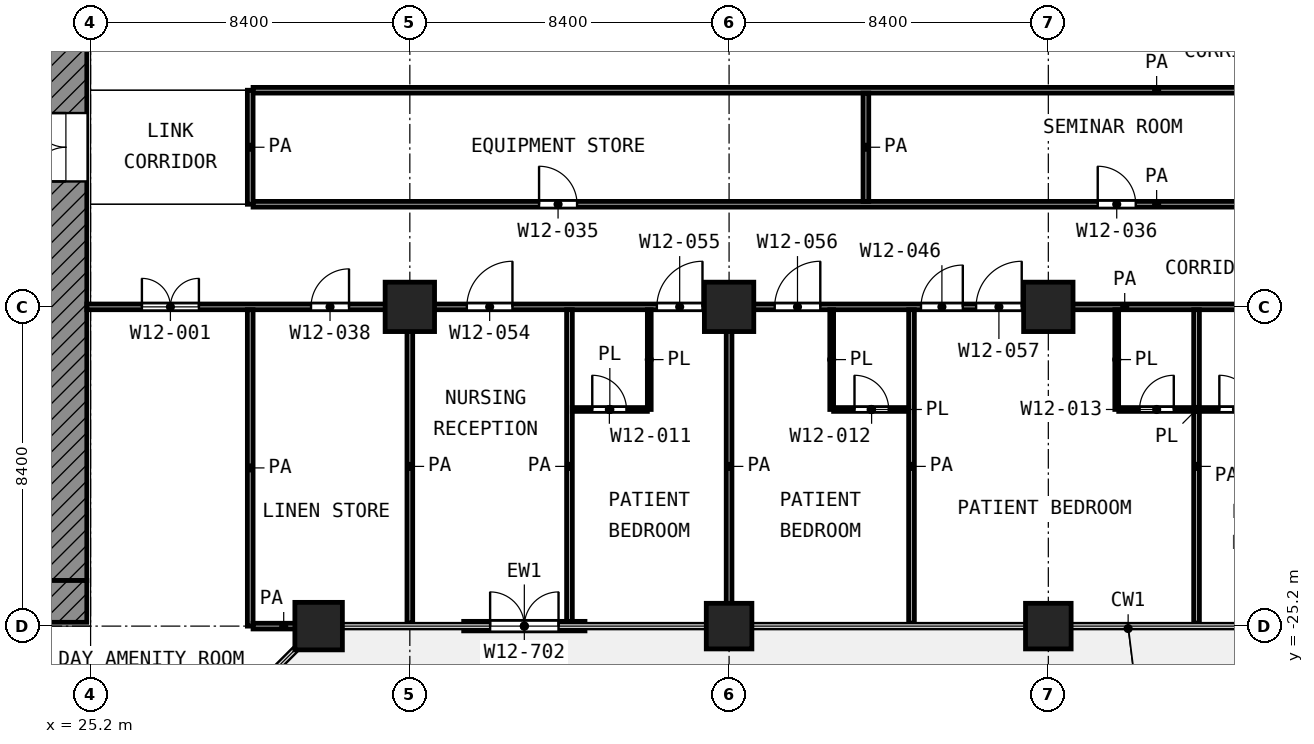
"""IFC4 building model, lengths in metres.
Left out: names, types, materials, properties, quantities, classifications, styles, units other than length and angle.
Written with IfcOpenShell. Run it as: python <this file> out.ifc"""

import sys

from ifc_helpers import new_model, si_unit, direction, frame, frame_2d, origin, origin_2d, place, context, subcontext, project, spatial, rectangle, extrude, element, fill, save


model = new_model("IFC4")
c1 = context("Model", 3, precision=1e-05, world=origin(), true_north=direction((0.0, 1.0)))
c2 = subcontext(c1, "Body", "Model", "MODEL_VIEW")
j1 = project(units=[si_unit("LENGTHUNIT", "METRE"), si_unit("PLANEANGLEUNIT", "RADIAN")], contexts=[c1])
p1 = place(None, origin())
s1 = spatial("IfcSite", under=j1, at=p1, CompositionType="ELEMENT")
p2 = place(p1, origin())
s2 = spatial("IfcBuilding", under=s1, at=p2, CompositionType="ELEMENT")
p3 = place(p2, frame((0.0, 0.0, 56.0)))
s3 = spatial("IfcBuildingStorey", under=s2, at=p3, CompositionType="ELEMENT", Elevation=56.0)
for number, where, z_axis, x_axis in (
    (1, (33.6, -16.8, 0.0), (0.0, 0.0, 1.0), (1.0, 0.0, 0.0)),
    (2, (42.0, -16.8, 0.0), (0.0, 0.0, 1.0), (1.0, 0.0, 0.0)),
    (3, (50.4, -16.8, 0.0), (0.0, 0.0, 1.0), (1.0, 0.0, 0.0)),
):
    element("IfcColumn", number, at=place(p3, frame(where, z_axis=z_axis, x_axis=x_axis)), inside=s3, PredefinedType="COLUMN", context=c2, shape_type="SweptSolid", body=[
        extrude(rectangle(XDim=1.3, YDim=1.3, at=origin_2d()), origin(), (0.0, 0.0, 1.0), 4.2),
    ])
p4 = place(p3, frame((31.2, -25.2, 0.0), z_axis=(0.0, 0.0, 1.0), x_axis=(1.0, 0.0, 0.0)))
e4 = element("IfcColumn", 4, at=p4, inside=s3, PredefinedType="COLUMN", context=c2, shape_type="SweptSolid", body=[
    extrude(rectangle(XDim=1.25, YDim=1.25, at=origin_2d()), origin(), (0.0, 0.0, 1.0), 4.2),
])
for number, where, z_axis, x_axis in (
    (5, (42.0, -25.2, 0.0), (0.0, 0.0, 1.0), (1.0, 0.0, 0.0)),
    (6, (50.4, -25.2, 0.0), (0.0, 0.0, 1.0), (1.0, 0.0, 0.0)),
):
    element("IfcColumn", number, at=place(p3, frame(where, z_axis=z_axis, x_axis=x_axis)), inside=s3, PredefinedType="COLUMN", context=c2, shape_type="SweptSolid", body=[
        extrude(rectangle(XDim=1.2, YDim=1.2, at=origin_2d()), origin(), (0.0, 0.0, 1.0), 4.2),
    ])
p5 = place(p3, frame((35.017, -25.2, 0.0), z_axis=(0.0, 0.0, 1.0), x_axis=(1.0, 0.0, 0.0)))
e7 = element("IfcWall", 7, at=p5, inside=s3, PredefinedType="SOLIDWALL", context=c2, shape_type="SweptSolid", body=[
    extrude(rectangle(XDim=3.192, YDim=0.25, at=frame_2d((1.596, 0.0))), origin(), (0.0, 0.0, 1.0), 3.78),
])
p6 = place(p5, frame((0.696, 0.0, 0.0)))
e8 = element("IfcOpeningElement", 8, at=p6, cuts=e7, PredefinedType="OPENING", context=c2, shape_type="SweptSolid", body=[
    extrude(rectangle(XDim=1.8, YDim=2.1, at=frame_2d((0.9, 1.05))), frame((0.0, 0.135, 0.0), z_axis=(0.0, -1.0, 0.0), x_axis=(1.0, 0.0, 0.0)), (0.0, 0.0, 1.0), 0.27),
])
p7 = place(p3, frame((24.55, -24.0, 0.0), z_axis=(0.0, 0.0, 1.0), x_axis=(0.0, 1.0, 0.0)))
e9 = element("IfcWall", 9, at=p7, inside=s3, PredefinedType="SHEAR", context=c2, shape_type="SweptSolid", body=[
    extrude(rectangle(XDim=18.6, YDim=1.1, at=frame_2d((9.3, 0.0))), origin(), (0.0, 0.0, 1.0), 3.9),
])
p8 = place(p7, frame((10.5, 0.0, 0.0)))
e10 = element("IfcOpeningElement", 10, at=p8, cuts=e9, PredefinedType="OPENING", context=c2, shape_type="SweptSolid", body=[
    extrude(rectangle(XDim=1.8, YDim=2.1, at=frame_2d((0.9, 1.05))), frame((0.0, 0.56, 0.0), z_axis=(0.0, -1.0, 0.0), x_axis=(1.0, 0.0, 0.0)), (0.0, 0.0, 1.0), 1.12),
])
p9 = place(p3, frame((24.55, -25.1, 0.0), z_axis=(0.0, 0.0, 1.0), x_axis=(0.0, 1.0, 0.0)))
e11 = element("IfcWall", 11, at=p9, inside=s3, PredefinedType="SHEAR", context=c2, shape_type="SweptSolid", body=[
    extrude(rectangle(XDim=1.1, YDim=1.1, at=frame_2d((0.55, 0.0))), origin(), (0.0, 0.0, 1.0), 3.9),
])
p10 = place(p3, frame((37.875, -19.5, 0.0), z_axis=(0.0, 0.0, 1.0), x_axis=(1.0, 0.0, 0.0)))
e12 = element("IfcWall", 12, at=p10, inside=s3, PredefinedType="PARTITIONING", context=c2, shape_type="SweptSolid", body=[
    extrude(rectangle(XDim=1.975, YDim=0.1, at=frame_2d((0.988, 0.0))), origin(), (0.0, 0.0, 1.0), 3.9),
])
p11 = place(p10, frame((0.525, 0.0, 0.0)))
e13 = element("IfcOpeningElement", 13, at=p11, cuts=e12, PredefinedType="OPENING", context=c2, shape_type="SweptSolid", body=[
    extrude(rectangle(XDim=0.9, YDim=2.1, at=frame_2d((0.45, 1.05))), frame((0.0, 0.06, 0.0), z_axis=(0.0, -1.0, 0.0), x_axis=(1.0, 0.0, 0.0)), (0.0, 0.0, 1.0), 0.12),
])
p12 = place(p3, frame((44.75, -19.5, 0.0), z_axis=(0.0, 0.0, 1.0), x_axis=(1.0, 0.0, 0.0)))
e14 = element("IfcWall", 14, at=p12, inside=s3, PredefinedType="PARTITIONING", context=c2, shape_type="SweptSolid", body=[
    extrude(rectangle(XDim=1.975, YDim=0.1, at=frame_2d((0.988, 0.0))), origin(), (0.0, 0.0, 1.0), 3.9),
])
p13 = place(p12, frame((0.55, 0.0, 0.0)))
e15 = element("IfcOpeningElement", 15, at=p13, cuts=e14, PredefinedType="OPENING", context=c2, shape_type="SweptSolid", body=[
    extrude(rectangle(XDim=0.9, YDim=2.1, at=frame_2d((0.45, 1.05))), frame((0.0, 0.06, 0.0), z_axis=(0.0, -1.0, 0.0), x_axis=(1.0, 0.0, 0.0)), (0.0, 0.0, 1.0), 0.12),
])
p14 = place(p3, frame((52.252, -19.5, 0.0), z_axis=(0.0, 0.0, 1.0), x_axis=(1.0, 0.0, 0.0)))
e16 = element("IfcWall", 16, at=p14, inside=s3, PredefinedType="PARTITIONING", context=c2, shape_type="SweptSolid", body=[
    extrude(rectangle(XDim=4.098, YDim=0.1, at=frame_2d((2.049, 0.0))), origin(), (0.0, 0.0, 1.0), 3.9),
])
p15 = place(p14, frame((0.549, 0.0, 0.0)))
e17 = element("IfcOpeningElement", 17, at=p15, cuts=e16, PredefinedType="OPENING", context=c2, shape_type="SweptSolid", body=[
    extrude(rectangle(XDim=0.9, YDim=2.1, at=frame_2d((0.45, 1.05))), frame((0.0, 0.06, 0.0), z_axis=(0.0, -1.0, 0.0), x_axis=(1.0, 0.0, 0.0)), (0.0, 0.0, 1.0), 0.12),
])
p16 = place(p14, frame((2.648, 0.0, 0.0)))
e18 = element("IfcOpeningElement", 18, at=p16, cuts=e16, PredefinedType="OPENING", context=c2, shape_type="SweptSolid", body=[
    extrude(rectangle(XDim=0.9, YDim=2.1, at=frame_2d((0.45, 1.05))), frame((0.0, 0.06, 0.0), z_axis=(0.0, -1.0, 0.0), x_axis=(1.0, 0.0, 0.0)), (0.0, 0.0, 1.0), 0.12),
])
for number, where, z_axis, x_axis in (
    (19, (39.9, -19.5, 0.0), (0.0, 0.0, 1.0), (0.0, 1.0, 0.0)),
    (20, (44.7, -19.5, 0.0), (0.0, 0.0, 1.0), (0.0, 1.0, 0.0)),
):
    element("IfcWall", number, at=place(p3, frame(where, z_axis=z_axis, x_axis=x_axis)), inside=s3, PredefinedType="PARTITIONING", context=c2, shape_type="SweptSolid", body=[
        extrude(rectangle(XDim=2.625, YDim=0.1, at=frame_2d((1.312, 0.0))), origin(), (0.0, 0.0, 1.0), 3.9),
    ])
p17 = place(p3, frame((52.2, -19.499, 0.0), z_axis=(0.0, 0.0, 1.0), x_axis=(0.0, 1.0, 0.0)))
e21 = element("IfcWall", 21, at=p17, inside=s3, PredefinedType="PARTITIONING", context=c2, shape_type="SweptSolid", body=[
    extrude(rectangle(XDim=2.624, YDim=0.1, at=frame_2d((1.312, 0.0))), origin(), (0.0, 0.0, 1.0), 3.9),
])
p18 = place(p3, frame((29.475, -25.2, 0.0), z_axis=(0.0, 0.0, 1.0), x_axis=(1.0, 0.0, 0.0)))
e22 = element("IfcWall", 22, at=p18, inside=s3, PredefinedType="PARTITIONING", context=c2, shape_type="SweptSolid", body=[
    extrude(rectangle(XDim=1.612, YDim=0.15, at=frame_2d((0.806, 0.0))), origin(), (0.0, 0.0, 1.0), 3.9),
])
p19 = place(p3, frame((25.1, -16.8, 0.0), z_axis=(0.0, 0.0, 1.0), x_axis=(1.0, 0.0, 0.0)))
e23 = element("IfcWall", 23, at=p19, inside=s3, PredefinedType="PARTITIONING", context=c2, shape_type="SweptSolid", body=[
    extrude(rectangle(XDim=54.62, YDim=0.15, at=frame_2d((27.31, 0.0))), origin(), (0.0, 0.0, 1.0), 3.9),
])
p20 = place(p19, frame((1.45, 0.0, 0.0)))
e24 = element("IfcOpeningElement", 24, at=p20, cuts=e23, PredefinedType="OPENING", context=c2, shape_type="SweptSolid", body=[
    extrude(rectangle(XDim=1.5, YDim=2.1, at=frame_2d((0.75, 1.05))), frame((0.0, 0.085, 0.0), z_axis=(0.0, -1.0, 0.0), x_axis=(1.0, 0.0, 0.0)), (0.0, 0.0, 1.0), 0.17),
])
p21 = place(p19, frame((5.9, 0.0, 0.0)))
e25 = element("IfcOpeningElement", 25, at=p21, cuts=e23, PredefinedType="OPENING", context=c2, shape_type="SweptSolid", body=[
    extrude(rectangle(XDim=1.0, YDim=2.1, at=frame_2d((0.5, 1.05))), frame((0.0, 0.085, 0.0), z_axis=(0.0, -1.0, 0.0), x_axis=(1.0, 0.0, 0.0)), (0.0, 0.0, 1.0), 0.17),
])
p22 = place(p19, frame((10.0, 0.0, 0.0)))
e26 = element("IfcOpeningElement", 26, at=p22, cuts=e23, PredefinedType="OPENING", context=c2, shape_type="SweptSolid", body=[
    extrude(rectangle(XDim=1.2, YDim=2.1, at=frame_2d((0.6, 1.05))), frame((0.0, 0.085, 0.0), z_axis=(0.0, -1.0, 0.0), x_axis=(1.0, 0.0, 0.0)), (0.0, 0.0, 1.0), 0.17),
])
p23 = place(p19, frame((15.0, 0.0, 0.0)))
e27 = element("IfcOpeningElement", 27, at=p23, cuts=e23, PredefinedType="OPENING", context=c2, shape_type="SweptSolid", body=[
    extrude(rectangle(XDim=1.2, YDim=2.1, at=frame_2d((0.6, 1.05))), frame((0.0, 0.085, 0.0), z_axis=(0.0, -1.0, 0.0), x_axis=(1.0, 0.0, 0.0)), (0.0, 0.0, 1.0), 0.17),
])
p24 = place(p19, frame((18.1, 0.0, 0.0)))
e28 = element("IfcOpeningElement", 28, at=p24, cuts=e23, PredefinedType="OPENING", context=c2, shape_type="SweptSolid", body=[
    extrude(rectangle(XDim=1.2, YDim=2.1, at=frame_2d((0.6, 1.05))), frame((0.0, 0.085, 0.0), z_axis=(0.0, -1.0, 0.0), x_axis=(1.0, 0.0, 0.0)), (0.0, 0.0, 1.0), 0.17),
])
p25 = place(p19, frame((23.4, 0.0, 0.0)))
e29 = element("IfcOpeningElement", 29, at=p25, cuts=e23, PredefinedType="OPENING", context=c2, shape_type="SweptSolid", body=[
    extrude(rectangle(XDim=1.2, YDim=2.1, at=frame_2d((0.6, 1.05))), frame((0.0, 0.085, 0.0), z_axis=(0.0, -1.0, 0.0), x_axis=(1.0, 0.0, 0.0)), (0.0, 0.0, 1.0), 0.17),
])
p26 = place(p19, frame((21.95, 0.0, 0.0)))
e30 = element("IfcOpeningElement", 30, at=p26, cuts=e23, PredefinedType="OPENING", context=c2, shape_type="SweptSolid", body=[
    extrude(rectangle(XDim=1.1, YDim=2.1, at=frame_2d((0.55, 1.05))), frame((0.0, 0.085, 0.0), z_axis=(0.0, -1.0, 0.0), x_axis=(1.0, 0.0, 0.0)), (0.0, 0.0, 1.0), 0.17),
])
p27 = place(p19, frame((31.8, 0.0, 0.0)))
e31 = element("IfcOpeningElement", 31, at=p27, cuts=e23, PredefinedType="OPENING", context=c2, shape_type="SweptSolid", body=[
    extrude(rectangle(XDim=1.2, YDim=2.1, at=frame_2d((0.6, 1.05))), frame((0.0, 0.085, 0.0), z_axis=(0.0, -1.0, 0.0), x_axis=(1.0, 0.0, 0.0)), (0.0, 0.0, 1.0), 0.17),
])
p28 = place(p19, frame((34.7, 0.0, 0.0)))
e32 = element("IfcOpeningElement", 32, at=p28, cuts=e23, PredefinedType="OPENING", context=c2, shape_type="SweptSolid", body=[
    extrude(rectangle(XDim=1.2, YDim=2.1, at=frame_2d((0.6, 1.05))), frame((0.0, 0.085, 0.0), z_axis=(0.0, -1.0, 0.0), x_axis=(1.0, 0.0, 0.0)), (0.0, 0.0, 1.0), 0.17),
])
p29 = place(p19, frame((43.3, 0.0, 0.0)))
e33 = element("IfcOpeningElement", 33, at=p29, cuts=e23, PredefinedType="OPENING", context=c2, shape_type="SweptSolid", body=[
    extrude(rectangle(XDim=1.2, YDim=2.1, at=frame_2d((0.6, 1.05))), frame((0.0, 0.085, 0.0), z_axis=(0.0, -1.0, 0.0), x_axis=(1.0, 0.0, 0.0)), (0.0, 0.0, 1.0), 0.17),
])
p30 = place(p19, frame((40.5, 0.0, 0.0)))
e34 = element("IfcOpeningElement", 34, at=p30, cuts=e23, PredefinedType="OPENING", context=c2, shape_type="SweptSolid", body=[
    extrude(rectangle(XDim=0.9, YDim=2.1, at=frame_2d((0.45, 1.05))), frame((0.0, 0.085, 0.0), z_axis=(0.0, -1.0, 0.0), x_axis=(1.0, 0.0, 0.0)), (0.0, 0.0, 1.0), 0.17),
])
p31 = place(p19, frame((48.25, 0.0, 0.0)))
e35 = element("IfcOpeningElement", 35, at=p31, cuts=e23, PredefinedType="OPENING", context=c2, shape_type="SweptSolid", body=[
    extrude(rectangle(XDim=1.5, YDim=2.1, at=frame_2d((0.75, 1.05))), frame((0.0, 0.085, 0.0), z_axis=(0.0, -1.0, 0.0), x_axis=(1.0, 0.0, 0.0)), (0.0, 0.0, 1.0), 0.17),
])
p32 = place(p3, frame((29.475, -14.1, 0.0), z_axis=(0.0, 0.0, 1.0), x_axis=(1.0, 0.0, 0.0)))
e36 = element("IfcWall", 36, at=p32, inside=s3, PredefinedType="PARTITIONING", context=c2, shape_type="SweptSolid", body=[
    extrude(rectangle(XDim=47.55, YDim=0.15, at=frame_2d((23.775, 0.0))), origin(), (0.0, 0.0, 1.0), 3.9),
])
p33 = place(p32, frame((7.525, 0.0, 0.0)))
e37 = element("IfcOpeningElement", 37, at=p33, cuts=e36, PredefinedType="OPENING", context=c2, shape_type="SweptSolid", body=[
    extrude(rectangle(XDim=1.0, YDim=2.1, at=frame_2d((0.5, 1.05))), frame((0.0, 0.085, 0.0), z_axis=(0.0, -1.0, 0.0), x_axis=(1.0, 0.0, 0.0)), (0.0, 0.0, 1.0), 0.17),
])
p34 = place(p32, frame((22.225, 0.0, 0.0)))
e38 = element("IfcOpeningElement", 38, at=p34, cuts=e36, PredefinedType="OPENING", context=c2, shape_type="SweptSolid", body=[
    extrude(rectangle(XDim=1.0, YDim=2.1, at=frame_2d((0.5, 1.05))), frame((0.0, 0.085, 0.0), z_axis=(0.0, -1.0, 0.0), x_axis=(1.0, 0.0, 0.0)), (0.0, 0.0, 1.0), 0.17),
])
p35 = place(p32, frame((31.275, 0.0, 0.0)))
e39 = element("IfcOpeningElement", 39, at=p35, cuts=e36, PredefinedType="OPENING", context=c2, shape_type="SweptSolid", body=[
    extrude(rectangle(XDim=0.9, YDim=2.1, at=frame_2d((0.45, 1.05))), frame((0.0, 0.085, 0.0), z_axis=(0.0, -1.0, 0.0), x_axis=(1.0, 0.0, 0.0)), (0.0, 0.0, 1.0), 0.17),
])
p36 = place(p3, frame((29.475, -11.1, 0.0), z_axis=(0.0, 0.0, 1.0), x_axis=(1.0, 0.0, 0.0)))
e40 = element("IfcWall", 40, at=p36, inside=s3, PredefinedType="PARTITIONING", context=c2, shape_type="SweptSolid", body=[
    extrude(rectangle(XDim=47.55, YDim=0.15, at=frame_2d((23.775, 0.0))), origin(), (0.0, 0.0, 1.0), 3.9),
])
p37 = place(p36, frame((35.425, 0.0, 0.0)))
e41 = element("IfcOpeningElement", 41, at=p37, cuts=e40, PredefinedType="OPENING", context=c2, shape_type="SweptSolid", body=[
    extrude(rectangle(XDim=1.0, YDim=2.1, at=frame_2d((0.5, 1.05))), frame((0.0, 0.085, 0.0), z_axis=(0.0, -1.0, 0.0), x_axis=(1.0, 0.0, 0.0)), (0.0, 0.0, 1.0), 0.17),
])
p38 = place(p36, frame((42.075, 0.0, 0.0)))
e42 = element("IfcOpeningElement", 42, at=p38, cuts=e40, PredefinedType="OPENING", context=c2, shape_type="SweptSolid", body=[
    extrude(rectangle(XDim=1.2, YDim=2.1, at=frame_2d((0.6, 1.05))), frame((0.0, 0.085, 0.0), z_axis=(0.0, -1.0, 0.0), x_axis=(1.0, 0.0, 0.0)), (0.0, 0.0, 1.0), 0.17),
])
p39 = place(p3, frame((29.4, -25.2, 0.0), z_axis=(0.0, 0.0, 1.0), x_axis=(0.0, 1.0, 0.0)))
e43 = element("IfcWall", 43, at=p39, inside=s3, PredefinedType="PARTITIONING", context=c2, shape_type="SweptSolid", body=[
    extrude(rectangle(XDim=8.325, YDim=0.15, at=frame_2d((4.163, 0.0))), origin(), (0.0, 0.0, 1.0), 3.9),
])
p40 = place(p3, frame((29.4, -14.1, 0.0), z_axis=(0.0, 0.0, 1.0), x_axis=(0.0, 1.0, 0.0)))
e44 = element("IfcWall", 44, at=p40, inside=s3, PredefinedType="PARTITIONING", context=c2, shape_type="SweptSolid", body=[
    extrude(rectangle(XDim=3.0, YDim=0.15, at=frame_2d((1.5, 0.0))), origin(), (0.0, 0.0, 1.0), 3.9),
])
for number, where, z_axis, x_axis in (
    (45, (33.6, -25.12, 0.0), (0.0, 0.0, 1.0), (0.0, 1.0, 0.0)),
    (46, (37.8, -25.12, 0.0), (0.0, 0.0, 1.0), (0.0, 1.0, 0.0)),
    (47, (42.0, -25.12, 0.0), (0.0, 0.0, 1.0), (0.0, 1.0, 0.0)),
):
    element("IfcWall", number, at=place(p3, frame(where, z_axis=z_axis, x_axis=x_axis)), inside=s3, PredefinedType="PARTITIONING", context=c2, shape_type="SweptSolid", body=[
        extrude(rectangle(XDim=8.245, YDim=0.15, at=frame_2d((4.123, 0.0))), origin(), (0.0, 0.0, 1.0), 3.9),
    ])
p41 = place(p3, frame((45.6, -14.025, 0.0), z_axis=(0.0, 0.0, 1.0), x_axis=(0.0, 1.0, 0.0)))
e48 = element("IfcWall", 48, at=p41, inside=s3, PredefinedType="PARTITIONING", context=c2, shape_type="SweptSolid", body=[
    extrude(rectangle(XDim=2.85, YDim=0.15, at=frame_2d((1.425, 0.0))), origin(), (0.0, 0.0, 1.0), 3.9),
])
for number, where, z_axis, x_axis in (
    (49, (46.8, -25.12, 0.0), (0.0, 0.0, 1.0), (0.0, 1.0, 0.0)),
    (50, (54.3, -25.12, 0.0), (0.0, 0.0, 1.0), (0.0, 1.0, 0.0)),
):
    element("IfcWall", number, at=place(p3, frame(where, z_axis=z_axis, x_axis=x_axis)), inside=s3, PredefinedType="PARTITIONING", context=c2, shape_type="SweptSolid", body=[
        extrude(rectangle(XDim=8.245, YDim=0.15, at=frame_2d((4.123, 0.0))), origin(), (0.0, 0.0, 1.0), 3.9),
    ])
p42 = place(p6, origin())
e51 = element("IfcDoor", 51, at=p42, inside=s3, OperationType="DOUBLE_DOOR_SINGLE_SWING", PredefinedType="DOOR", context=c2, shape_type="SweptSolid", body=[
    extrude(rectangle(XDim=1.8, YDim=2.1, at=frame_2d((0.9, 1.05))), frame((0.0, 0.025, 0.0), z_axis=(0.0, -1.0, 0.0), x_axis=(1.0, 0.0, 0.0)), (0.0, 0.0, 1.0), 0.05),
])
fill(e8, e51)
p43 = place(p8, origin())
e52 = element("IfcDoor", 52, at=p43, inside=s3, OperationType="DOUBLE_DOOR_SINGLE_SWING", PredefinedType="DOOR", context=c2, shape_type="SweptSolid", body=[
    extrude(rectangle(XDim=1.8, YDim=2.1, at=frame_2d((0.9, 1.05))), frame((0.0, 0.025, 0.0), z_axis=(0.0, -1.0, 0.0), x_axis=(1.0, 0.0, 0.0)), (0.0, 0.0, 1.0), 0.05),
])
fill(e10, e52)
p44 = place(p20, origin())
e53 = element("IfcDoor", 53, at=p44, inside=s3, OperationType="DOUBLE_DOOR_SINGLE_SWING", PredefinedType="DOOR", context=c2, shape_type="SweptSolid", body=[
    extrude(rectangle(XDim=1.5, YDim=2.1, at=frame_2d((0.75, 1.05))), frame((0.0, 0.025, 0.0), z_axis=(0.0, -1.0, 0.0), x_axis=(1.0, 0.0, 0.0)), (0.0, 0.0, 1.0), 0.05),
])
fill(e24, e53)
p45 = place(p33, origin())
e54 = element("IfcDoor", 54, at=p45, inside=s3, OperationType="SINGLE_SWING_LEFT", PredefinedType="DOOR", context=c2, shape_type="SweptSolid", body=[
    extrude(rectangle(XDim=1.0, YDim=2.1, at=frame_2d((0.5, 1.05))), frame((0.0, 0.025, 0.0), z_axis=(0.0, -1.0, 0.0), x_axis=(1.0, 0.0, 0.0)), (0.0, 0.0, 1.0), 0.05),
])
fill(e37, e54)
p46 = place(p34, origin())
e55 = element("IfcDoor", 55, at=p46, inside=s3, OperationType="SINGLE_SWING_LEFT", PredefinedType="DOOR", context=c2, shape_type="SweptSolid", body=[
    extrude(rectangle(XDim=1.0, YDim=2.1, at=frame_2d((0.5, 1.05))), frame((0.0, 0.025, 0.0), z_axis=(0.0, -1.0, 0.0), x_axis=(1.0, 0.0, 0.0)), (0.0, 0.0, 1.0), 0.05),
])
fill(e38, e55)
p47 = place(p21, origin())
e56 = element("IfcDoor", 56, at=p47, inside=s3, OperationType="SINGLE_SWING_RIGHT", PredefinedType="DOOR", context=c2, shape_type="SweptSolid", body=[
    extrude(rectangle(XDim=1.0, YDim=2.1, at=frame_2d((0.5, 1.05))), frame((0.0, 0.025, 0.0), z_axis=(0.0, -1.0, 0.0), x_axis=(1.0, 0.0, 0.0)), (0.0, 0.0, 1.0), 0.05),
])
fill(e25, e56)
p48 = place(p22, origin())
e57 = element("IfcDoor", 57, at=p48, inside=s3, OperationType="SINGLE_SWING_RIGHT", PredefinedType="DOOR", context=c2, shape_type="SweptSolid", body=[
    extrude(rectangle(XDim=1.2, YDim=2.1, at=frame_2d((0.6, 1.05))), frame((0.0, 0.025, 0.0), z_axis=(0.0, -1.0, 0.0), x_axis=(1.0, 0.0, 0.0)), (0.0, 0.0, 1.0), 0.05),
])
fill(e26, e57)
p49 = place(p23, origin())
e58 = element("IfcDoor", 58, at=p49, inside=s3, OperationType="SINGLE_SWING_RIGHT", PredefinedType="DOOR", context=c2, shape_type="SweptSolid", body=[
    extrude(rectangle(XDim=1.2, YDim=2.1, at=frame_2d((0.6, 1.05))), frame((0.0, 0.025, 0.0), z_axis=(0.0, -1.0, 0.0), x_axis=(1.0, 0.0, 0.0)), (0.0, 0.0, 1.0), 0.05),
])
fill(e27, e58)
p50 = place(p11, origin())
e59 = element("IfcDoor", 59, at=p50, inside=s3, OperationType="SINGLE_SWING_LEFT", PredefinedType="DOOR", context=c2, shape_type="SweptSolid", body=[
    extrude(rectangle(XDim=0.9, YDim=2.1, at=frame_2d((0.45, 1.05))), frame((0.0, 0.025, 0.0), z_axis=(0.0, -1.0, 0.0), x_axis=(1.0, 0.0, 0.0)), (0.0, 0.0, 1.0), 0.05),
])
fill(e13, e59)
p51 = place(p24, origin())
e60 = element("IfcDoor", 60, at=p51, inside=s3, OperationType="SINGLE_SWING_RIGHT", PredefinedType="DOOR", context=c2, shape_type="SweptSolid", body=[
    extrude(rectangle(XDim=1.2, YDim=2.1, at=frame_2d((0.6, 1.05))), frame((0.0, 0.025, 0.0), z_axis=(0.0, -1.0, 0.0), x_axis=(1.0, 0.0, 0.0)), (0.0, 0.0, 1.0), 0.05),
])
fill(e28, e60)
p52 = place(p13, origin())
e61 = element("IfcDoor", 61, at=p52, inside=s3, OperationType="SINGLE_SWING_LEFT", PredefinedType="DOOR", context=c2, shape_type="SweptSolid", body=[
    extrude(rectangle(XDim=0.9, YDim=2.1, at=frame_2d((0.45, 1.05))), frame((0.0, 0.025, 0.0), z_axis=(0.0, -1.0, 0.0), x_axis=(1.0, 0.0, 0.0)), (0.0, 0.0, 1.0), 0.05),
])
fill(e15, e61)
p53 = place(p25, origin())
e62 = element("IfcDoor", 62, at=p53, inside=s3, OperationType="SINGLE_SWING_RIGHT", PredefinedType="DOOR", context=c2, shape_type="SweptSolid", body=[
    extrude(rectangle(XDim=1.2, YDim=2.1, at=frame_2d((0.6, 1.05))), frame((0.0, 0.025, 0.0), z_axis=(0.0, -1.0, 0.0), x_axis=(1.0, 0.0, 0.0)), (0.0, 0.0, 1.0), 0.05),
])
fill(e29, e62)
p54 = place(p26, origin())
e63 = element("IfcDoor", 63, at=p54, inside=s3, OperationType="SINGLE_SWING_RIGHT", PredefinedType="DOOR", context=c2, shape_type="SweptSolid", body=[
    extrude(rectangle(XDim=1.1, YDim=2.1, at=frame_2d((0.55, 1.05))), frame((0.0, 0.025, 0.0), z_axis=(0.0, -1.0, 0.0), x_axis=(1.0, 0.0, 0.0)), (0.0, 0.0, 1.0), 0.05),
])
fill(e30, e63)
p55 = place(p15, origin())
e64 = element("IfcDoor", 64, at=p55, inside=s3, OperationType="SINGLE_SWING_RIGHT", PredefinedType="DOOR", context=c2, shape_type="SweptSolid", body=[
    extrude(rectangle(XDim=0.9, YDim=2.1, at=frame_2d((0.45, 1.05))), frame((0.0, 0.025, 0.0), z_axis=(0.0, -1.0, 0.0), x_axis=(1.0, 0.0, 0.0)), (0.0, 0.0, 1.0), 0.05),
])
fill(e17, e64)
p56 = place(p16, origin())
e65 = element("IfcDoor", 65, at=p56, inside=s3, OperationType="SINGLE_SWING_LEFT", PredefinedType="DOOR", context=c2, shape_type="SweptSolid", body=[
    extrude(rectangle(XDim=0.9, YDim=2.1, at=frame_2d((0.45, 1.05))), frame((0.0, 0.025, 0.0), z_axis=(0.0, -1.0, 0.0), x_axis=(1.0, 0.0, 0.0)), (0.0, 0.0, 1.0), 0.05),
])
fill(e18, e65)
save(model, sys.argv[1])
